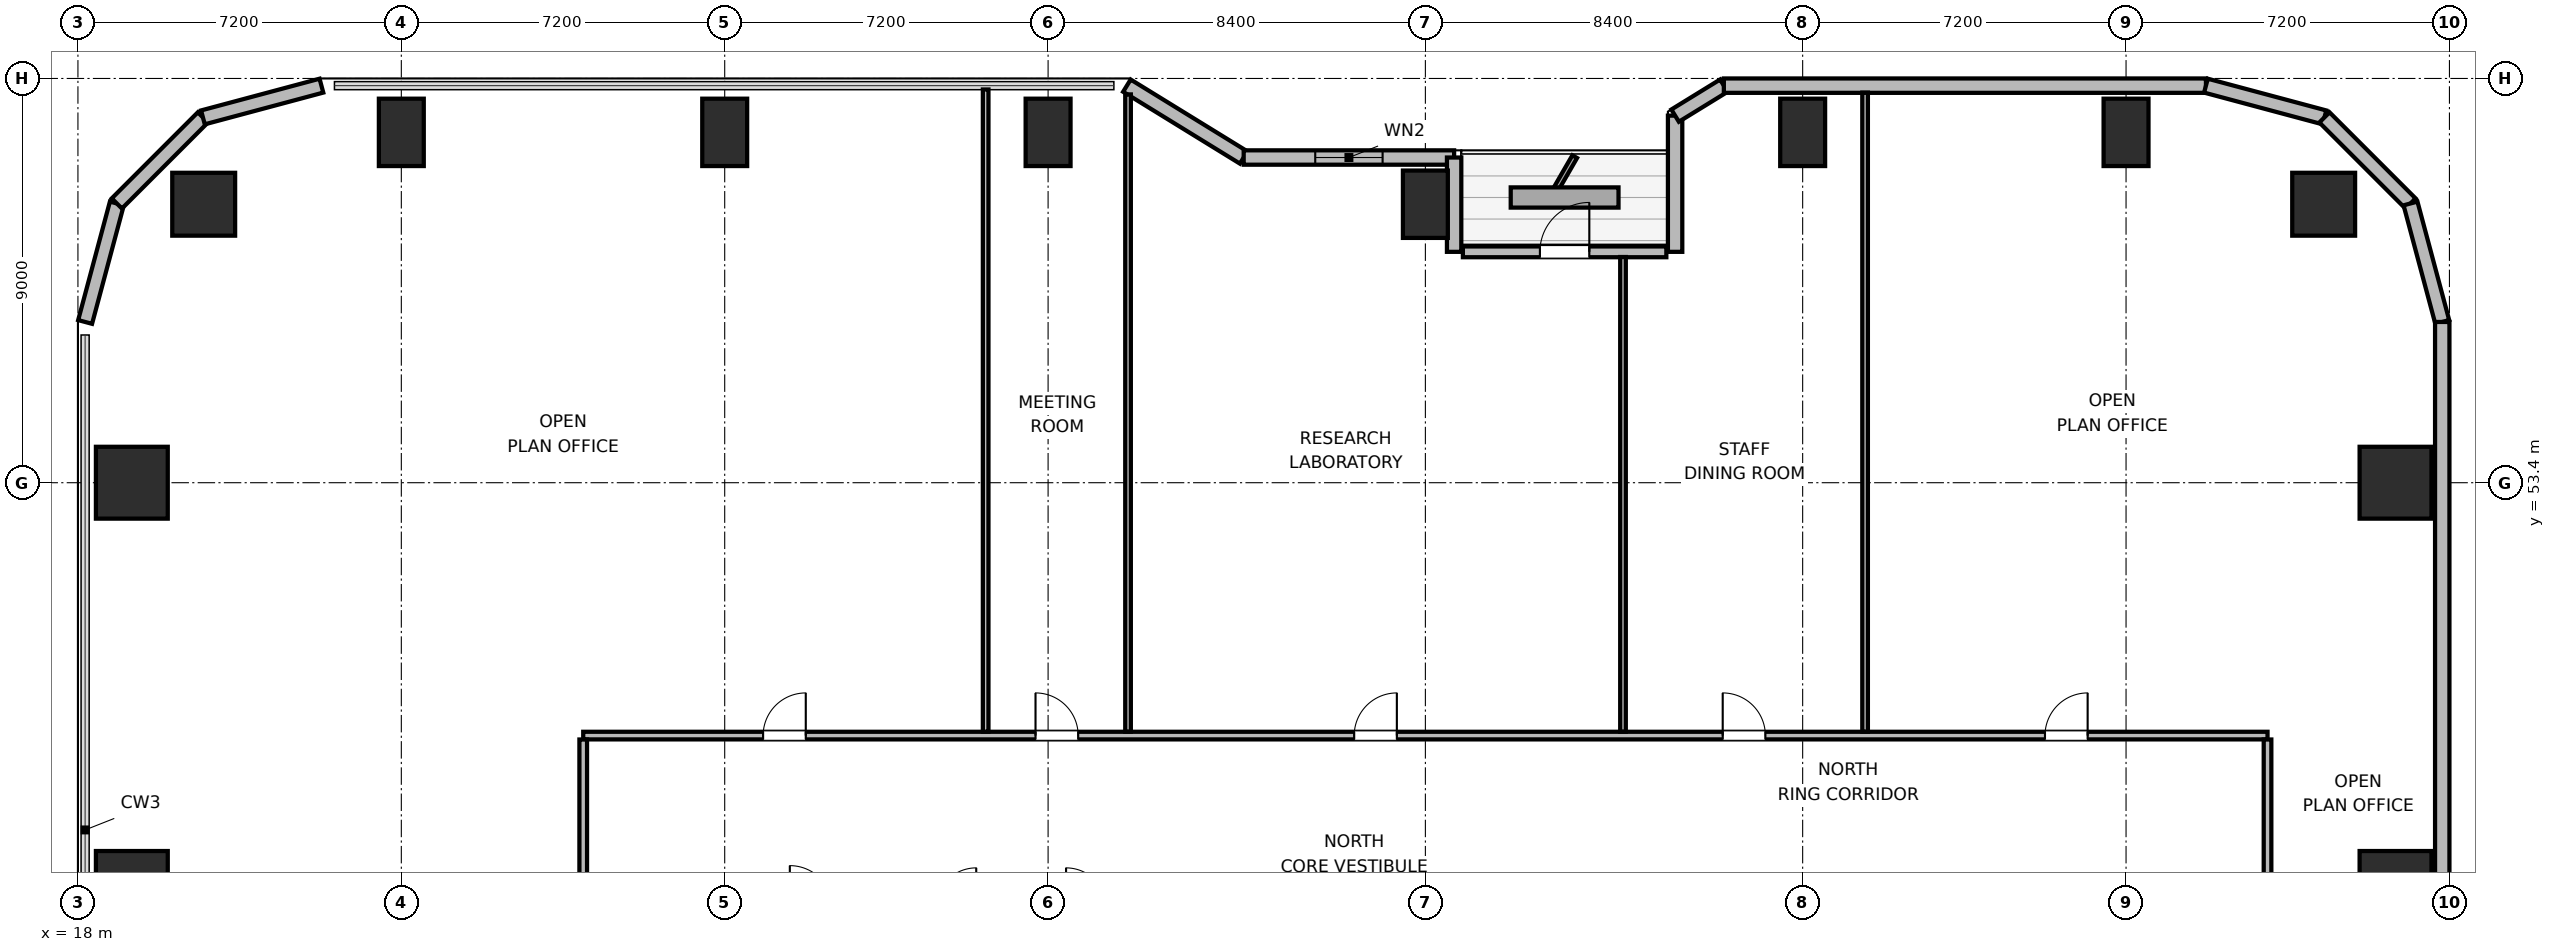
"""IFC4 building model, lengths in metres.
Left out: names, types, materials, properties, quantities, classifications, styles, units other than length and angle.
Written with IfcOpenShell. Run it as: python <this file> out.ifc"""

import sys

from ifc_helpers import new_model, si_unit, direction, frame, frame_2d, origin, origin_2d, place, context, subcontext, project, spatial, rectangle, circle, extrude, element, fill, save


model = new_model("IFC4")
c1 = context("Model", 3, precision=1e-05, world=origin(), true_north=direction((0.0, 1.0)))
c2 = subcontext(c1, "Body", "Model", "MODEL_VIEW")
j1 = project(units=[si_unit("LENGTHUNIT", "METRE"), si_unit("PLANEANGLEUNIT", "RADIAN")], contexts=[c1])
p1 = place(None, origin())
s1 = spatial("IfcSite", under=j1, at=p1, CompositionType="ELEMENT")
p2 = place(p1, origin())
s2 = spatial("IfcBuilding", under=s1, at=p2, CompositionType="ELEMENT")
p3 = place(p2, frame((0.0, 0.0, 85.8)))
s3 = spatial("IfcBuildingStorey", under=s2, at=p3, CompositionType="ELEMENT", Elevation=85.8)
for number, where, z_axis, x_axis in (
    (1, (68.0, 59.6, 0.0), (0.0, 0.0, 1.0), (1.0, 0.0, 0.0)),
    (2, (20.8, 59.6, 0.0), (0.0, 0.0, 1.0), (1.0, 0.0, 0.0)),
):
    element("IfcColumn", number, at=place(p3, frame(where, z_axis=z_axis, x_axis=x_axis)), inside=s3, PredefinedType="COLUMN", context=c2, shape_type="SweptSolid", body=[
        extrude(circle(Radius=0.7, at=origin_2d()), origin(), (0.0, 0.0, 1.0), 3.9),
    ])
for number, where, z_axis, x_axis in (
    (3, (25.2, 61.2, 0.0), (0.0, 0.0, 1.0), (1.0, 0.0, 0.0)),
    (4, (32.4, 61.2, 0.0), (0.0, 0.0, 1.0), (1.0, 0.0, 0.0)),
    (5, (39.6, 61.2, 0.0), (0.0, 0.0, 1.0), (1.0, 0.0, 0.0)),
    (6, (48.0, 59.6, 0.0), (0.0, 0.0, 1.0), (1.0, 0.0, 0.0)),
    (7, (56.4, 61.2, 0.0), (0.0, 0.0, 1.0), (1.0, 0.0, 0.0)),
    (8, (63.6, 61.2, 0.0), (0.0, 0.0, 1.0), (1.0, 0.0, 0.0)),
):
    element("IfcColumn", number, at=place(p3, frame(where, z_axis=z_axis, x_axis=x_axis)), inside=s3, PredefinedType="COLUMN", context=c2, shape_type="SweptSolid", body=[
        extrude(rectangle(XDim=1.0, YDim=1.5, at=origin_2d()), origin(), (0.0, 0.0, 1.0), 3.9),
    ])
for number, where, z_axis, x_axis in (
    (9, (19.2, 44.4, 0.0), (0.0, 0.0, 1.0), (1.0, 0.0, 0.0)),
    (10, (69.6, 44.4, 0.0), (0.0, 0.0, 1.0), (1.0, 0.0, 0.0)),
    (11, (19.2, 53.4, 0.0), (0.0, 0.0, 1.0), (1.0, 0.0, 0.0)),
    (12, (69.6, 53.4, 0.0), (0.0, 0.0, 1.0), (1.0, 0.0, 0.0)),
):
    element("IfcColumn", number, at=place(p3, frame(where, z_axis=z_axis, x_axis=x_axis)), inside=s3, PredefinedType="COLUMN", context=c2, shape_type="SweptSolid", body=[
        extrude(rectangle(XDim=1.6, YDim=1.6, at=origin_2d()), origin(), (0.0, 0.0, 1.0), 3.9),
    ])
p4 = place(p3, frame((18.16, 56.979, 0.0), z_axis=(0.0, 0.0, 1.0), x_axis=(0.25869736047, 0.965958423373, 0.0)))
e13 = element("IfcWall", 13, at=p4, inside=s3, PredefinedType="SOLIDWALL", context=c2, shape_type="SweptSolid", body=[
    extrude(rectangle(XDim=2.731, YDim=0.32, at=frame_2d((1.366, 0.0))), origin(), (0.0, 0.0, 1.0), 3.64),
])
p5 = place(p3, frame((18.866, 59.617, 0.0), z_axis=(0.0, 0.0, 1.0), x_axis=(0.707106781187, 0.707106781187, 0.0)))
e14 = element("IfcWall", 14, at=p5, inside=s3, PredefinedType="SOLIDWALL", context=c2, shape_type="SweptSolid", body=[
    extrude(rectangle(XDim=2.71, YDim=0.32, at=frame_2d((1.355, 0.0))), origin(), (0.0, 0.0, 1.0), 3.64),
])
p6 = place(p3, frame((20.783, 61.533, 0.0), z_axis=(0.0, 0.0, 1.0), x_axis=(0.965964405026, 0.25867502435, 0.0)))
e15 = element("IfcWall", 15, at=p6, inside=s3, PredefinedType="SOLIDWALL", context=c2, shape_type="SweptSolid", body=[
    extrude(rectangle(XDim=2.731, YDim=0.32, at=frame_2d((1.366, 0.0))), origin(), (0.0, 0.0, 1.0), 3.64),
])
p7 = place(p3, frame((41.355, 62.24, 0.0), z_axis=(0.0, 0.0, 1.0), x_axis=(0.851630857047, -0.524142044989, 0.0)))
e16 = element("IfcWall", 16, at=p7, inside=s3, PredefinedType="SOLIDWALL", context=c2, shape_type="SweptSolid", body=[
    extrude(rectangle(XDim=3.053, YDim=0.32, at=frame_2d((1.526, 0.0))), origin(), (0.0, 0.0, 1.0), 2.875),
])
p8 = place(p3, frame((43.955, 60.64, 0.0), z_axis=(0.0, 0.0, 1.0), x_axis=(1.0, 0.0, 0.0)))
e17 = element("IfcWall", 17, at=p8, inside=s3, PredefinedType="SOLIDWALL", context=c2, shape_type="SweptSolid", body=[
    extrude(rectangle(XDim=4.685, YDim=0.32, at=frame_2d((2.343, 0.0))), origin(), (0.0, 0.0, 1.0), 2.875),
])
p9 = place(p8, frame((1.593, 0.0, 0.85)))
e18 = element("IfcOpeningElement", 18, at=p9, cuts=e17, PredefinedType="OPENING", context=c2, shape_type="SweptSolid", body=[
    extrude(rectangle(XDim=1.5, YDim=1.1, at=frame_2d((0.75, 0.55))), frame((0.0, 0.17, 0.0), z_axis=(0.0, -1.0, 0.0), x_axis=(1.0, 0.0, 0.0)), (0.0, 0.0, 1.0), 0.34),
])
p10 = place(p3, frame((48.64, 60.64, 0.0), z_axis=(0.0, 0.0, 1.0), x_axis=(0.0, -1.0, 0.0)))
e19 = element("IfcWall", 19, at=p10, inside=s3, PredefinedType="SOLIDWALL", context=c2, shape_type="SweptSolid", body=[
    extrude(rectangle(XDim=2.1, YDim=0.32, at=frame_2d((1.05, 0.0))), origin(), (0.0, 0.0, 1.0), 2.875),
])
p11 = place(p3, frame((48.835, 58.54, 0.0), z_axis=(0.0, 0.0, 1.0), x_axis=(1.0, 0.0, 0.0)))
e20 = element("IfcWall", 20, at=p11, inside=s3, PredefinedType="SOLIDWALL", context=c2, shape_type="SweptSolid", body=[
    extrude(rectangle(XDim=4.53, YDim=0.24, at=frame_2d((2.265, 0.0))), origin(), (0.0, 0.0, 1.0), 3.64),
])
p12 = place(p11, frame((1.715, 0.0, 0.0)))
e21 = element("IfcOpeningElement", 21, at=p12, cuts=e20, PredefinedType="OPENING", context=c2, shape_type="SweptSolid", body=[
    extrude(rectangle(XDim=1.1, YDim=2.04, at=frame_2d((0.55, 1.02))), frame((0.0, 0.13, 0.0), z_axis=(0.0, -1.0, 0.0), x_axis=(1.0, 0.0, 0.0)), (0.0, 0.0, 1.0), 0.26),
])
p13 = place(p3, frame((53.56, 58.54, 0.0), z_axis=(0.0, 0.0, 1.0), x_axis=(0.0, 1.0, 0.0)))
e22 = element("IfcWall", 22, at=p13, inside=s3, PredefinedType="SOLIDWALL", context=c2, shape_type="SweptSolid", body=[
    extrude(rectangle(XDim=3.032, YDim=0.32, at=frame_2d((1.516, 0.0))), origin(), (0.0, 0.0, 1.0), 2.875),
])
p14 = place(p3, frame((53.56, 61.573, 0.0), z_axis=(0.0, 0.0, 1.0), x_axis=(0.851776724646, 0.523904964045, 0.0)))
e23 = element("IfcWall", 23, at=p14, inside=s3, PredefinedType="SOLIDWALL", context=c2, shape_type="SweptSolid", body=[
    extrude(rectangle(XDim=1.274, YDim=0.32, at=frame_2d((0.637, 0.0))), origin(), (0.0, 0.0, 1.0), 3.64),
])
p15 = place(p3, frame((54.645, 62.24, 0.0), z_axis=(0.0, 0.0, 1.0), x_axis=(1.0, 0.0, 0.0)))
e24 = element("IfcWall", 24, at=p15, inside=s3, PredefinedType="SOLIDWALL", context=c2, shape_type="SweptSolid", body=[
    extrude(rectangle(XDim=10.734, YDim=0.32, at=frame_2d((5.367, 0.0))), origin(), (0.0, 0.0, 1.0), 3.64),
])
p16 = place(p3, frame((65.379, 62.24, 0.0), z_axis=(0.0, 0.0, 1.0), x_axis=(0.965958423373, -0.25869736047, 0.0)))
e25 = element("IfcWall", 25, at=p16, inside=s3, PredefinedType="SOLIDWALL", context=c2, shape_type="SweptSolid", body=[
    extrude(rectangle(XDim=2.731, YDim=0.32, at=frame_2d((1.366, 0.0))), origin(), (0.0, 0.0, 1.0), 3.64),
])
p17 = place(p3, frame((68.017, 61.533, 0.0), z_axis=(0.0, 0.0, 1.0), x_axis=(0.707151821269, -0.707061738235, 0.0)))
e26 = element("IfcWall", 26, at=p17, inside=s3, PredefinedType="SOLIDWALL", context=c2, shape_type="SweptSolid", body=[
    extrude(rectangle(XDim=2.71, YDim=0.32, at=frame_2d((1.355, 0.0))), origin(), (0.0, 0.0, 1.0), 3.64),
])
p18 = place(p3, frame((69.934, 59.617, 0.0), z_axis=(0.0, 0.0, 1.0), x_axis=(0.258613949072, -0.965980758269, 0.0)))
e27 = element("IfcWall", 27, at=p18, inside=s3, PredefinedType="SOLIDWALL", context=c2, shape_type="SweptSolid", body=[
    extrude(rectangle(XDim=2.731, YDim=0.32, at=frame_2d((1.366, 0.0))), origin(), (0.0, 0.0, 1.0), 3.64),
])
p19 = place(p3, frame((70.64, 56.979, 0.0), z_axis=(0.0, 0.0, 1.0), x_axis=(0.0, -1.0, 0.0)))
e28 = element("IfcWall", 28, at=p19, inside=s3, PredefinedType="SOLIDWALL", context=c2, shape_type="SweptSolid", body=[
    extrude(rectangle(XDim=14.219, YDim=0.32, at=frame_2d((7.109, 0.0))), origin(), (0.0, 0.0, 1.0), 3.64),
])
p20 = place(p3, frame((29.25, 47.77, 0.0), z_axis=(0.0, 0.0, 1.0), x_axis=(1.0, 0.0, 0.0)))
e29 = element("IfcWall", 29, at=p20, inside=s3, PredefinedType="PARTITIONING", context=c2, shape_type="SweptSolid", body=[
    extrude(rectangle(XDim=37.5, YDim=0.17, at=frame_2d((18.75, 0.0))), origin(), (0.0, 0.0, 1.0), 3.64),
])
p21 = place(p20, frame((4.005, 0.0, 0.0)))
e30 = element("IfcOpeningElement", 30, at=p21, cuts=e29, PredefinedType="OPENING", context=c2, shape_type="SweptSolid", body=[
    extrude(rectangle(XDim=0.95, YDim=2.04, at=frame_2d((0.475, 1.02))), frame((0.0, 0.095, 0.0), z_axis=(0.0, -1.0, 0.0), x_axis=(1.0, 0.0, 0.0)), (0.0, 0.0, 1.0), 0.19),
])
p22 = place(p20, frame((10.07, 0.0, 0.0)))
e31 = element("IfcOpeningElement", 31, at=p22, cuts=e29, PredefinedType="OPENING", context=c2, shape_type="SweptSolid", body=[
    extrude(rectangle(XDim=0.95, YDim=2.04, at=frame_2d((0.475, 1.02))), frame((0.0, 0.095, 0.0), z_axis=(0.0, -1.0, 0.0), x_axis=(1.0, 0.0, 0.0)), (0.0, 0.0, 1.0), 0.19),
])
p23 = place(p20, frame((17.165, 0.0, 0.0)))
e32 = element("IfcOpeningElement", 32, at=p23, cuts=e29, PredefinedType="OPENING", context=c2, shape_type="SweptSolid", body=[
    extrude(rectangle(XDim=0.95, YDim=2.04, at=frame_2d((0.475, 1.02))), frame((0.0, 0.095, 0.0), z_axis=(0.0, -1.0, 0.0), x_axis=(1.0, 0.0, 0.0)), (0.0, 0.0, 1.0), 0.19),
])
p24 = place(p20, frame((25.37, 0.0, 0.0)))
e33 = element("IfcOpeningElement", 33, at=p24, cuts=e29, PredefinedType="OPENING", context=c2, shape_type="SweptSolid", body=[
    extrude(rectangle(XDim=0.95, YDim=2.04, at=frame_2d((0.475, 1.02))), frame((0.0, 0.095, 0.0), z_axis=(0.0, -1.0, 0.0), x_axis=(1.0, 0.0, 0.0)), (0.0, 0.0, 1.0), 0.19),
])
p25 = place(p20, frame((32.545, 0.0, 0.0)))
e34 = element("IfcOpeningElement", 34, at=p25, cuts=e29, PredefinedType="OPENING", context=c2, shape_type="SweptSolid", body=[
    extrude(rectangle(XDim=0.95, YDim=2.04, at=frame_2d((0.475, 1.02))), frame((0.0, 0.095, 0.0), z_axis=(0.0, -1.0, 0.0), x_axis=(1.0, 0.0, 0.0)), (0.0, 0.0, 1.0), 0.19),
])
p26 = place(p3, frame((29.25, 24.317, 0.0), z_axis=(0.0, 0.0, 1.0), x_axis=(0.0, 1.0, 0.0)))
e35 = element("IfcWall", 35, at=p26, inside=s3, PredefinedType="PARTITIONING", context=c2, shape_type="SweptSolid", body=[
    extrude(rectangle(XDim=23.366, YDim=0.17, at=frame_2d((11.683, 0.0))), origin(), (0.0, 0.0, 1.0), 3.64),
])
p27 = place(p26, frame((4.023, 0.0, 0.0)))
e36 = element("IfcOpeningElement", 36, at=p27, cuts=e35, PredefinedType="OPENING", context=c2, shape_type="SweptSolid", body=[
    extrude(rectangle(XDim=0.95, YDim=2.04, at=frame_2d((0.475, 1.02))), frame((0.0, 0.095, 0.0), z_axis=(0.0, -1.0, 0.0), x_axis=(1.0, 0.0, 0.0)), (0.0, 0.0, 1.0), 0.19),
])
p28 = place(p26, frame((11.808, 0.0, 0.0)))
e37 = element("IfcOpeningElement", 37, at=p28, cuts=e35, PredefinedType="OPENING", context=c2, shape_type="SweptSolid", body=[
    extrude(rectangle(XDim=0.95, YDim=2.04, at=frame_2d((0.475, 1.02))), frame((0.0, 0.095, 0.0), z_axis=(0.0, -1.0, 0.0), x_axis=(1.0, 0.0, 0.0)), (0.0, 0.0, 1.0), 0.19),
])
p29 = place(p26, frame((18.993, 0.0, 0.0)))
e38 = element("IfcOpeningElement", 38, at=p29, cuts=e35, PredefinedType="OPENING", context=c2, shape_type="SweptSolid", body=[
    extrude(rectangle(XDim=0.95, YDim=2.04, at=frame_2d((0.475, 1.02))), frame((0.0, 0.095, 0.0), z_axis=(0.0, -1.0, 0.0), x_axis=(1.0, 0.0, 0.0)), (0.0, 0.0, 1.0), 0.19),
])
p30 = place(p3, frame((66.75, 24.317, 0.0), z_axis=(0.0, 0.0, 1.0), x_axis=(0.0, 1.0, 0.0)))
e39 = element("IfcWall", 39, at=p30, inside=s3, PredefinedType="PARTITIONING", context=c2, shape_type="SweptSolid", body=[
    extrude(rectangle(XDim=23.366, YDim=0.17, at=frame_2d((11.683, 0.0))), origin(), (0.0, 0.0, 1.0), 3.64),
])
p31 = place(p30, frame((4.823, 0.0, 0.0)))
e40 = element("IfcOpeningElement", 40, at=p31, cuts=e39, PredefinedType="OPENING", context=c2, shape_type="SweptSolid", body=[
    extrude(rectangle(XDim=0.95, YDim=2.04, at=frame_2d((0.475, 1.02))), frame((0.0, 0.095, 0.0), z_axis=(0.0, -1.0, 0.0), x_axis=(1.0, 0.0, 0.0)), (0.0, 0.0, 1.0), 0.19),
])
p32 = place(p30, frame((16.593, 0.0, 0.0)))
e41 = element("IfcOpeningElement", 41, at=p32, cuts=e39, PredefinedType="OPENING", context=c2, shape_type="SweptSolid", body=[
    extrude(rectangle(XDim=0.95, YDim=2.04, at=frame_2d((0.475, 1.02))), frame((0.0, 0.095, 0.0), z_axis=(0.0, -1.0, 0.0), x_axis=(1.0, 0.0, 0.0)), (0.0, 0.0, 1.0), 0.19),
])
p33 = place(p3, frame((38.21, 47.857, 0.0), z_axis=(0.0, 0.0, 1.0), x_axis=(0.0, 1.0, 0.0)))
e42 = element("IfcWall", 42, at=p33, inside=s3, PredefinedType="PARTITIONING", context=c2, shape_type="SweptSolid", body=[
    extrude(rectangle(XDim=14.298, YDim=0.125, at=frame_2d((7.149, 0.0))), origin(), (0.0, 0.0, 1.0), 3.64),
])
p34 = place(p3, frame((41.38, 47.857, 0.0), z_axis=(0.0, 0.0, 1.0), x_axis=(0.0, 1.0, 0.0)))
e43 = element("IfcWall", 43, at=p34, inside=s3, PredefinedType="PARTITIONING", context=c2, shape_type="SweptSolid", body=[
    extrude(rectangle(XDim=14.188, YDim=0.125, at=frame_2d((7.094, 0.0))), origin(), (0.0, 0.0, 1.0), 3.003),
])
p35 = place(p3, frame((52.4, 47.857, 0.0), z_axis=(0.0, 0.0, 1.0), x_axis=(0.0, 1.0, 0.0)))
e44 = element("IfcWall", 44, at=p35, inside=s3, PredefinedType="PARTITIONING", context=c2, shape_type="SweptSolid", body=[
    extrude(rectangle(XDim=10.568, YDim=0.125, at=frame_2d((5.284, 0.0))), origin(), (0.0, 0.0, 1.0), 3.003),
])
p36 = place(p3, frame((57.79, 47.857, 0.0), z_axis=(0.0, 0.0, 1.0), x_axis=(0.0, 1.0, 0.0)))
e45 = element("IfcWall", 45, at=p36, inside=s3, PredefinedType="PARTITIONING", context=c2, shape_type="SweptSolid", body=[
    extrude(rectangle(XDim=14.228, YDim=0.125, at=frame_2d((7.114, 0.0))), origin(), (0.0, 0.0, 1.0), 3.64),
])
p37 = place(p9, origin())
e46 = element("IfcWindow", 46, at=p37, inside=s3, PartitioningType="SINGLE_PANEL", PredefinedType="WINDOW", context=c2, shape_type="SweptSolid", body=[
    extrude(rectangle(XDim=1.5, YDim=1.1, at=frame_2d((0.75, 0.55))), frame((0.0, 0.03, 0.0), z_axis=(0.0, -1.0, 0.0), x_axis=(1.0, 0.0, 0.0)), (0.0, 0.0, 1.0), 0.06),
])
fill(e18, e46)
p38 = place(p12, origin())
e47 = element("IfcDoor", 47, at=p38, inside=s3, OperationType="SINGLE_SWING_RIGHT", PredefinedType="DOOR", context=c2, shape_type="SweptSolid", body=[
    extrude(rectangle(XDim=1.1, YDim=2.04, at=frame_2d((0.55, 1.02))), frame((0.0, 0.025, 0.0), z_axis=(0.0, -1.0, 0.0), x_axis=(1.0, 0.0, 0.0)), (0.0, 0.0, 1.0), 0.05),
])
fill(e21, e47)
p39 = place(p21, origin())
e48 = element("IfcDoor", 48, at=p39, inside=s3, OperationType="SINGLE_SWING_RIGHT", PredefinedType="DOOR", context=c2, shape_type="SweptSolid", body=[
    extrude(rectangle(XDim=0.95, YDim=2.04, at=frame_2d((0.475, 1.02))), frame((0.0, 0.025, 0.0), z_axis=(0.0, -1.0, 0.0), x_axis=(1.0, 0.0, 0.0)), (0.0, 0.0, 1.0), 0.05),
])
fill(e30, e48)
p40 = place(p22, origin())
e49 = element("IfcDoor", 49, at=p40, inside=s3, OperationType="SINGLE_SWING_LEFT", PredefinedType="DOOR", context=c2, shape_type="SweptSolid", body=[
    extrude(rectangle(XDim=0.95, YDim=2.04, at=frame_2d((0.475, 1.02))), frame((0.0, 0.025, 0.0), z_axis=(0.0, -1.0, 0.0), x_axis=(1.0, 0.0, 0.0)), (0.0, 0.0, 1.0), 0.05),
])
fill(e31, e49)
p41 = place(p23, origin())
e50 = element("IfcDoor", 50, at=p41, inside=s3, OperationType="SINGLE_SWING_RIGHT", PredefinedType="DOOR", context=c2, shape_type="SweptSolid", body=[
    extrude(rectangle(XDim=0.95, YDim=2.04, at=frame_2d((0.475, 1.02))), frame((0.0, 0.025, 0.0), z_axis=(0.0, -1.0, 0.0), x_axis=(1.0, 0.0, 0.0)), (0.0, 0.0, 1.0), 0.05),
])
fill(e32, e50)
p42 = place(p24, origin())
e51 = element("IfcDoor", 51, at=p42, inside=s3, OperationType="SINGLE_SWING_LEFT", PredefinedType="DOOR", context=c2, shape_type="SweptSolid", body=[
    extrude(rectangle(XDim=0.95, YDim=2.04, at=frame_2d((0.475, 1.02))), frame((0.0, 0.025, 0.0), z_axis=(0.0, -1.0, 0.0), x_axis=(1.0, 0.0, 0.0)), (0.0, 0.0, 1.0), 0.05),
])
fill(e33, e51)
p43 = place(p25, origin())
e52 = element("IfcDoor", 52, at=p43, inside=s3, OperationType="SINGLE_SWING_RIGHT", PredefinedType="DOOR", context=c2, shape_type="SweptSolid", body=[
    extrude(rectangle(XDim=0.95, YDim=2.04, at=frame_2d((0.475, 1.02))), frame((0.0, 0.025, 0.0), z_axis=(0.0, -1.0, 0.0), x_axis=(1.0, 0.0, 0.0)), (0.0, 0.0, 1.0), 0.05),
])
fill(e34, e52)
save(model, sys.argv[1])
